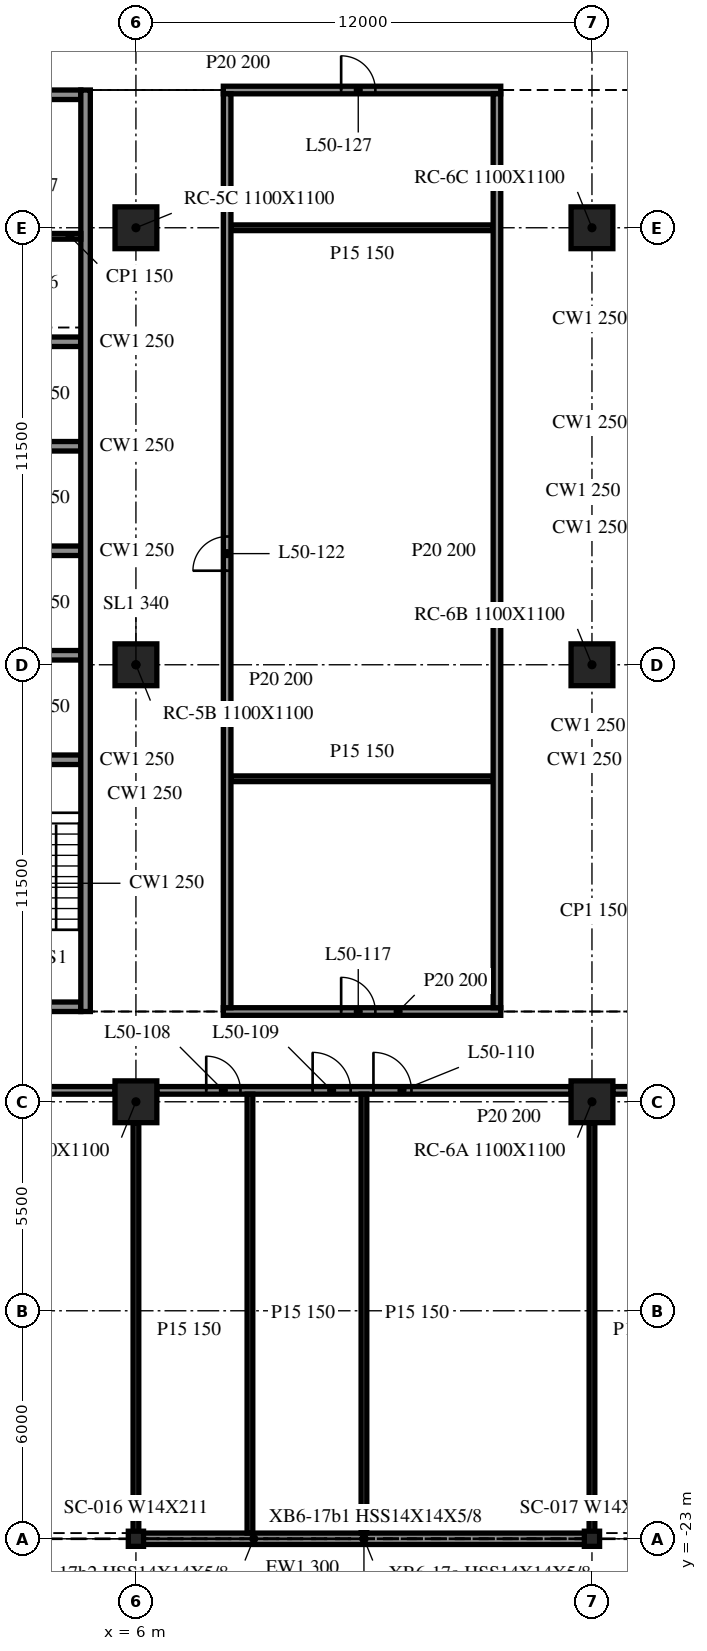
"""IFC4 building model, lengths in metres.
Left out: names, types, materials, properties, quantities, classifications, styles, units other than length and angle.
Written with IfcOpenShell. Run it as: python <this file> out.ifc"""

import sys

from ifc_helpers import new_model, si_unit, direction, frame, frame_2d, origin, origin_2d, place, context, subcontext, project, spatial, rectangle, i_section, extrude, element, fill, save


model = new_model("IFC4")
c1 = context("Model", 3, precision=1e-05, world=origin(), true_north=direction((0.0, 1.0)))
c2 = subcontext(c1, "Body", "Model", "MODEL_VIEW")
j1 = project(units=[si_unit("LENGTHUNIT", "METRE"), si_unit("PLANEANGLEUNIT", "RADIAN")], contexts=[c1])
p1 = place(None, origin())
s1 = spatial("IfcSite", under=j1, at=p1, CompositionType="ELEMENT")
p2 = place(p1, origin())
s2 = spatial("IfcBuilding", under=s1, at=p2, CompositionType="ELEMENT")
p3 = place(p2, frame((0.0, 0.0, 209.1)))
s3 = spatial("IfcBuildingStorey", under=s2, at=p3, CompositionType="ELEMENT", Elevation=209.1)
for number, where, z_axis, x_axis in (
    (1, (6.0, -11.5, -0.34), (0.0, 0.0, 1.0), (1.0, 0.0, 0.0)),
    (2, (6.0, 0.0, -0.34), (0.0, 0.0, 1.0), (1.0, 0.0, 0.0)),
    (3, (6.0, 11.5, -0.34), (0.0, 0.0, 1.0), (1.0, 0.0, 0.0)),
    (4, (18.0, -11.5, -0.34), (0.0, 0.0, 1.0), (1.0, 0.0, 0.0)),
    (5, (18.0, 0.0, -0.34), (0.0, 0.0, 1.0), (1.0, 0.0, 0.0)),
    (6, (18.0, 11.5, -0.34), (0.0, 0.0, 1.0), (1.0, 0.0, 0.0)),
):
    element("IfcColumn", number, at=place(p3, frame(where, z_axis=z_axis, x_axis=x_axis)), inside=s3, PredefinedType="COLUMN", context=c2, shape_type="SweptSolid", body=[
        extrude(rectangle(XDim=1.1, YDim=1.1, at=origin_2d()), origin(), (0.0, 0.0, 1.0), 3.8),
    ])
for number, where, z_axis, x_axis in (
    (7, (6.0, -23.0, -0.34), (0.0, 0.0, 1.0), (1.0, 0.0, 0.0)),
    (8, (18.0, -23.0, -0.34), (0.0, 0.0, 1.0), (1.0, 0.0, 0.0)),
):
    element("IfcColumn", number, at=place(p3, frame(where, z_axis=z_axis, x_axis=x_axis)), inside=s3, PredefinedType="COLUMN", context=c2, shape_type="SweptSolid", body=[
        extrude(i_section(OverallWidth=0.401, OverallDepth=0.399, WebThickness=0.025, FlangeThickness=0.04, at=origin_2d()), origin(), (0.0, 0.0, 1.0), 3.8),
    ])
p4 = place(p3, frame((6.012, -23.0, 0.0), z_axis=(0.0, 0.0, 1.0), x_axis=(1.0, 0.0, 0.0)))
e9 = element("IfcWall", 9, at=p4, inside=s3, PredefinedType="NOTDEFINED", context=c2, shape_type="SweptSolid", body=[
    extrude(rectangle(XDim=11.975, YDim=0.3, at=frame_2d((5.988, 0.0))), origin(), (0.0, 0.0, 1.0), 2.782),
])
p5 = place(p3, frame((4.675, -9.125, 0.0), z_axis=(0.0, 0.0, 1.0), x_axis=(0.0, 1.0, 0.0)))
e10 = element("IfcWall", 10, at=p5, inside=s3, PredefinedType="SOLIDWALL", context=c2, shape_type="SweptSolid", body=[
    extrude(rectangle(XDim=24.25, YDim=0.25, at=frame_2d((12.125, 0.0))), origin(), (0.0, 0.0, 1.0), 3.46),
])
p6 = place(p3, frame((4.55, -9.0, 0.0), z_axis=(0.0, 0.0, 1.0), x_axis=(-1.0, 0.0, 0.0)))
e11 = element("IfcWall", 11, at=p6, inside=s3, PredefinedType="SOLIDWALL", context=c2, shape_type="SweptSolid", body=[
    extrude(rectangle(XDim=9.1, YDim=0.25, at=frame_2d((4.55, 0.0))), origin(), (0.0, 0.0, 1.0), 3.46),
])
p7 = place(p6, frame((3.65, 0.0, 0.0)))
e12 = element("IfcOpeningElement", 12, at=p7, cuts=e11, PredefinedType="OPENING", context=c2, shape_type="SweptSolid", body=[
    extrude(rectangle(XDim=1.8, YDim=2.1, at=frame_2d((0.9, 1.05))), frame((0.0, 0.135, 0.0), z_axis=(0.0, -1.0, 0.0), x_axis=(1.0, 0.0, 0.0)), (0.0, 0.0, 1.0), 0.27),
])
p8 = place(p3, frame((-4.55, 15.0, 0.0), z_axis=(0.0, 0.0, 1.0), x_axis=(1.0, 0.0, 0.0)))
e13 = element("IfcWall", 13, at=p8, inside=s3, PredefinedType="SOLIDWALL", context=c2, shape_type="SweptSolid", body=[
    extrude(rectangle(XDim=9.1, YDim=0.25, at=frame_2d((4.55, 0.0))), origin(), (0.0, 0.0, 1.0), 3.46),
])
p9 = place(p8, frame((3.65, 0.0, 0.0)))
e14 = element("IfcOpeningElement", 14, at=p9, cuts=e13, PredefinedType="OPENING", context=c2, shape_type="SweptSolid", body=[
    extrude(rectangle(XDim=1.8, YDim=2.1, at=frame_2d((0.9, 1.05))), frame((0.0, 0.135, 0.0), z_axis=(0.0, -1.0, 0.0), x_axis=(1.0, 0.0, 0.0)), (0.0, 0.0, 1.0), 0.27),
])
for number, where, z_axis, x_axis in (
    (15, (1.7, -2.5, 0.0), (0.0, 0.0, 1.0), (1.0, 0.0, 0.0)),
    (16, (1.7, 0.25, 0.0), (0.0, 0.0, 1.0), (1.0, 0.0, 0.0)),
    (17, (1.7, 3.0, 0.0), (0.0, 0.0, 1.0), (1.0, 0.0, 0.0)),
    (18, (1.7, 5.75, 0.0), (0.0, 0.0, 1.0), (1.0, 0.0, 0.0)),
    (19, (1.7, 8.5, 0.0), (0.0, 0.0, 1.0), (1.0, 0.0, 0.0)),
):
    element("IfcWall", number, at=place(p3, frame(where, z_axis=z_axis, x_axis=x_axis)), inside=s3, PredefinedType="SOLIDWALL", context=c2, shape_type="SweptSolid", body=[
        extrude(rectangle(XDim=2.85, YDim=0.25, at=frame_2d((1.425, 0.0))), origin(), (0.0, 0.0, 1.0), 3.46),
    ])
p10 = place(p3, frame((1.7, 11.275, 0.0), z_axis=(0.0, 0.0, 1.0), x_axis=(1.0, 0.0, 0.0)))
e20 = element("IfcWall", 20, at=p10, inside=s3, PredefinedType="PARTITIONING", context=c2, shape_type="SweptSolid", body=[
    extrude(rectangle(XDim=2.85, YDim=0.15, at=frame_2d((1.425, 0.0))), origin(), (0.0, 0.0, 1.0), 3.46),
])
p11 = place(p3, frame((-5.45, -11.2, 0.0), z_axis=(0.0, 0.0, 1.0), x_axis=(1.0, 0.0, 0.0)))
e21 = element("IfcWall", 21, at=p11, inside=s3, PredefinedType="PARTITIONING", context=c2, shape_type="SweptSolid", body=[
    extrude(rectangle(XDim=10.9, YDim=0.2, at=frame_2d((5.45, 0.0))), origin(), (0.0, 0.0, 1.0), 3.46),
])
p12 = place(p11, frame((4.9, 0.0, 0.0)))
e22 = element("IfcOpeningElement", 22, at=p12, cuts=e21, PredefinedType="OPENING", context=c2, shape_type="SweptSolid", body=[
    extrude(rectangle(XDim=1.0, YDim=2.1, at=frame_2d((0.5, 1.05))), frame((0.0, 0.11, 0.0), z_axis=(0.0, -1.0, 0.0), x_axis=(1.0, 0.0, 0.0)), (0.0, 0.0, 1.0), 0.22),
])
p13 = place(p3, frame((6.55, -11.2, 0.0), z_axis=(0.0, 0.0, 1.0), x_axis=(1.0, 0.0, 0.0)))
e23 = element("IfcWall", 23, at=p13, inside=s3, PredefinedType="PARTITIONING", context=c2, shape_type="SweptSolid", body=[
    extrude(rectangle(XDim=10.9, YDim=0.2, at=frame_2d((5.45, 0.0))), origin(), (0.0, 0.0, 1.0), 3.46),
])
p14 = place(p13, frame((1.3, 0.0, 0.0)))
e24 = element("IfcOpeningElement", 24, at=p14, cuts=e23, PredefinedType="OPENING", context=c2, shape_type="SweptSolid", body=[
    extrude(rectangle(XDim=0.9, YDim=2.1, at=frame_2d((0.45, 1.05))), frame((0.0, 0.11, 0.0), z_axis=(0.0, -1.0, 0.0), x_axis=(1.0, 0.0, 0.0)), (0.0, 0.0, 1.0), 0.22),
])
p15 = place(p13, frame((4.1, 0.0, 0.0)))
e25 = element("IfcOpeningElement", 25, at=p15, cuts=e23, PredefinedType="OPENING", context=c2, shape_type="SweptSolid", body=[
    extrude(rectangle(XDim=1.0, YDim=2.1, at=frame_2d((0.5, 1.05))), frame((0.0, 0.11, 0.0), z_axis=(0.0, -1.0, 0.0), x_axis=(1.0, 0.0, 0.0)), (0.0, 0.0, 1.0), 0.22),
])
p16 = place(p13, frame((5.7, 0.0, 0.0)))
e26 = element("IfcOpeningElement", 26, at=p16, cuts=e23, PredefinedType="OPENING", context=c2, shape_type="SweptSolid", body=[
    extrude(rectangle(XDim=1.0, YDim=2.1, at=frame_2d((0.5, 1.05))), frame((0.0, 0.11, 0.0), z_axis=(0.0, -1.0, 0.0), x_axis=(1.0, 0.0, 0.0)), (0.0, 0.0, 1.0), 0.22),
])
p17 = place(p3, frame((18.55, -11.2, 0.0), z_axis=(0.0, 0.0, 1.0), x_axis=(1.0, 0.0, 0.0)))
e27 = element("IfcWall", 27, at=p17, inside=s3, PredefinedType="PARTITIONING", context=c2, shape_type="SweptSolid", body=[
    extrude(rectangle(XDim=10.9, YDim=0.2, at=frame_2d((5.45, 0.0))), origin(), (0.0, 0.0, 1.0), 3.46),
])
p18 = place(p17, frame((4.9, 0.0, 0.0)))
e28 = element("IfcOpeningElement", 28, at=p18, cuts=e27, PredefinedType="OPENING", context=c2, shape_type="SweptSolid", body=[
    extrude(rectangle(XDim=1.0, YDim=2.1, at=frame_2d((0.5, 1.05))), frame((0.0, 0.11, 0.0), z_axis=(0.0, -1.0, 0.0), x_axis=(1.0, 0.0, 0.0)), (0.0, 0.0, 1.0), 0.22),
])
p19 = place(p3, frame((8.3, -9.125, 0.0), z_axis=(0.0, 0.0, 1.0), x_axis=(1.0, 0.0, 0.0)))
e29 = element("IfcWall", 29, at=p19, inside=s3, PredefinedType="PARTITIONING", context=c2, shape_type="SweptSolid", body=[
    extrude(rectangle(XDim=7.3, YDim=0.2, at=frame_2d((3.65, 0.0))), origin(), (0.0, 0.0, 1.0), 3.46),
])
p20 = place(p19, frame((3.1, 0.0, 0.0)))
e30 = element("IfcOpeningElement", 30, at=p20, cuts=e29, PredefinedType="OPENING", context=c2, shape_type="SweptSolid", body=[
    extrude(rectangle(XDim=0.9, YDim=2.1, at=frame_2d((0.45, 1.05))), frame((0.0, 0.11, 0.0), z_axis=(0.0, -1.0, 0.0), x_axis=(1.0, 0.0, 0.0)), (0.0, 0.0, 1.0), 0.22),
])
for number, where, z_axis, x_axis in (
    (31, (8.5, -3.0, 0.0), (0.0, 0.0, 1.0), (1.0, 0.0, 0.0)),
    (32, (8.5, 11.5, 0.0), (0.0, 0.0, 1.0), (1.0, 0.0, 0.0)),
):
    element("IfcWall", number, at=place(p3, frame(where, z_axis=z_axis, x_axis=x_axis)), inside=s3, PredefinedType="PARTITIONING", context=c2, shape_type="SweptSolid", body=[
        extrude(rectangle(XDim=6.9, YDim=0.15, at=frame_2d((3.45, 0.0))), origin(), (0.0, 0.0, 1.0), 3.46),
    ])
p21 = place(p3, frame((8.3, 15.125, 0.0), z_axis=(0.0, 0.0, 1.0), x_axis=(1.0, 0.0, 0.0)))
e33 = element("IfcWall", 33, at=p21, inside=s3, PredefinedType="PARTITIONING", context=c2, shape_type="SweptSolid", body=[
    extrude(rectangle(XDim=7.3, YDim=0.2, at=frame_2d((3.65, 0.0))), origin(), (0.0, 0.0, 1.0), 3.46),
])
p22 = place(p21, frame((3.1, 0.0, 0.0)))
e34 = element("IfcOpeningElement", 34, at=p22, cuts=e33, PredefinedType="OPENING", context=c2, shape_type="SweptSolid", body=[
    extrude(rectangle(XDim=0.9, YDim=2.1, at=frame_2d((0.45, 1.05))), frame((0.0, 0.11, 0.0), z_axis=(0.0, -1.0, 0.0), x_axis=(1.0, 0.0, 0.0)), (0.0, 0.0, 1.0), 0.22),
])
p23 = place(p3, frame((6.0, -22.975, 0.0), z_axis=(0.0, 0.0, 1.0), x_axis=(0.0, 1.0, 0.0)))
e35 = element("IfcWall", 35, at=p23, inside=s3, PredefinedType="PARTITIONING", context=c2, shape_type="SweptSolid", body=[
    extrude(rectangle(XDim=10.925, YDim=0.15, at=frame_2d((5.462, 0.0))), origin(), (0.0, 0.0, 1.0), 3.46),
])
p24 = place(p3, frame((8.4, -9.025, 0.0), z_axis=(0.0, 0.0, 1.0), x_axis=(0.0, 1.0, 0.0)))
e36 = element("IfcWall", 36, at=p24, inside=s3, PredefinedType="PARTITIONING", context=c2, shape_type="SweptSolid", body=[
    extrude(rectangle(XDim=24.05, YDim=0.2, at=frame_2d((12.025, 0.0))), origin(), (0.0, 0.0, 1.0), 3.46),
])
p25 = place(p24, frame((11.5, 0.0, 0.0)))
e37 = element("IfcOpeningElement", 37, at=p25, cuts=e36, PredefinedType="OPENING", context=c2, shape_type="SweptSolid", body=[
    extrude(rectangle(XDim=0.9, YDim=2.1, at=frame_2d((0.45, 1.05))), frame((0.0, 0.11, 0.0), z_axis=(0.0, -1.0, 0.0), x_axis=(1.0, 0.0, 0.0)), (0.0, 0.0, 1.0), 0.22),
])
for number, where, z_axis, x_axis in (
    (38, (9.0, -22.85, 0.0), (0.0, 0.0, 1.0), (0.0, 1.0, 0.0)),
    (39, (12.0, -22.85, 0.0), (0.0, 0.0, 1.0), (0.0, 1.0, 0.0)),
):
    element("IfcWall", number, at=place(p3, frame(where, z_axis=z_axis, x_axis=x_axis)), inside=s3, PredefinedType="PARTITIONING", context=c2, shape_type="SweptSolid", body=[
        extrude(rectangle(XDim=11.55, YDim=0.15, at=frame_2d((5.775, 0.0))), origin(), (0.0, 0.0, 1.0), 3.46),
    ])
p26 = place(p3, frame((15.5, -9.025, 0.0), z_axis=(0.0, 0.0, 1.0), x_axis=(0.0, 1.0, 0.0)))
e40 = element("IfcWall", 40, at=p26, inside=s3, PredefinedType="PARTITIONING", context=c2, shape_type="SweptSolid", body=[
    extrude(rectangle(XDim=24.05, YDim=0.2, at=frame_2d((12.025, 0.0))), origin(), (0.0, 0.0, 1.0), 3.46),
])
p27 = place(p3, frame((18.0, -22.975, 0.0), z_axis=(0.0, 0.0, 1.0), x_axis=(0.0, 1.0, 0.0)))
e41 = element("IfcWall", 41, at=p27, inside=s3, PredefinedType="PARTITIONING", context=c2, shape_type="SweptSolid", body=[
    extrude(rectangle(XDim=10.925, YDim=0.15, at=frame_2d((5.462, 0.0))), origin(), (0.0, 0.0, 1.0), 3.46),
])
p28 = place(p14, origin())
e42 = element("IfcDoor", 42, at=p28, inside=s3, OperationType="SINGLE_SWING_RIGHT", PredefinedType="DOOR", context=c2, shape_type="SweptSolid", body=[
    extrude(rectangle(XDim=0.9, YDim=2.1, at=frame_2d((0.45, 1.05))), frame((0.0, 0.025, 0.0), z_axis=(0.0, -1.0, 0.0), x_axis=(1.0, 0.0, 0.0)), (0.0, 0.0, 1.0), 0.05),
])
fill(e24, e42)
p29 = place(p15, origin())
e43 = element("IfcDoor", 43, at=p29, inside=s3, OperationType="SINGLE_SWING_RIGHT", PredefinedType="DOOR", context=c2, shape_type="SweptSolid", body=[
    extrude(rectangle(XDim=1.0, YDim=2.1, at=frame_2d((0.5, 1.05))), frame((0.0, 0.025, 0.0), z_axis=(0.0, -1.0, 0.0), x_axis=(1.0, 0.0, 0.0)), (0.0, 0.0, 1.0), 0.05),
])
fill(e25, e43)
p30 = place(p16, origin())
e44 = element("IfcDoor", 44, at=p30, inside=s3, OperationType="SINGLE_SWING_LEFT", PredefinedType="DOOR", context=c2, shape_type="SweptSolid", body=[
    extrude(rectangle(XDim=1.0, YDim=2.1, at=frame_2d((0.5, 1.05))), frame((0.0, 0.025, 0.0), z_axis=(0.0, -1.0, 0.0), x_axis=(1.0, 0.0, 0.0)), (0.0, 0.0, 1.0), 0.05),
])
fill(e26, e44)
p31 = place(p20, origin())
e45 = element("IfcDoor", 45, at=p31, inside=s3, OperationType="SINGLE_SWING_LEFT", PredefinedType="DOOR", context=c2, shape_type="SweptSolid", body=[
    extrude(rectangle(XDim=0.9, YDim=2.1, at=frame_2d((0.45, 1.05))), frame((0.0, 0.025, 0.0), z_axis=(0.0, -1.0, 0.0), x_axis=(1.0, 0.0, 0.0)), (0.0, 0.0, 1.0), 0.05),
])
fill(e30, e45)
p32 = place(p25, origin())
e46 = element("IfcDoor", 46, at=p32, inside=s3, OperationType="SINGLE_SWING_RIGHT", PredefinedType="DOOR", context=c2, shape_type="SweptSolid", body=[
    extrude(rectangle(XDim=0.9, YDim=2.1, at=frame_2d((0.45, 1.05))), frame((0.0, 0.025, 0.0), z_axis=(0.0, -1.0, 0.0), x_axis=(1.0, 0.0, 0.0)), (0.0, 0.0, 1.0), 0.05),
])
fill(e37, e46)
p33 = place(p22, origin())
e47 = element("IfcDoor", 47, at=p33, inside=s3, OperationType="SINGLE_SWING_RIGHT", PredefinedType="DOOR", context=c2, shape_type="SweptSolid", body=[
    extrude(rectangle(XDim=0.9, YDim=2.1, at=frame_2d((0.45, 1.05))), frame((0.0, 0.025, 0.0), z_axis=(0.0, -1.0, 0.0), x_axis=(1.0, 0.0, 0.0)), (0.0, 0.0, 1.0), 0.05),
])
fill(e34, e47)
save(model, sys.argv[1])
